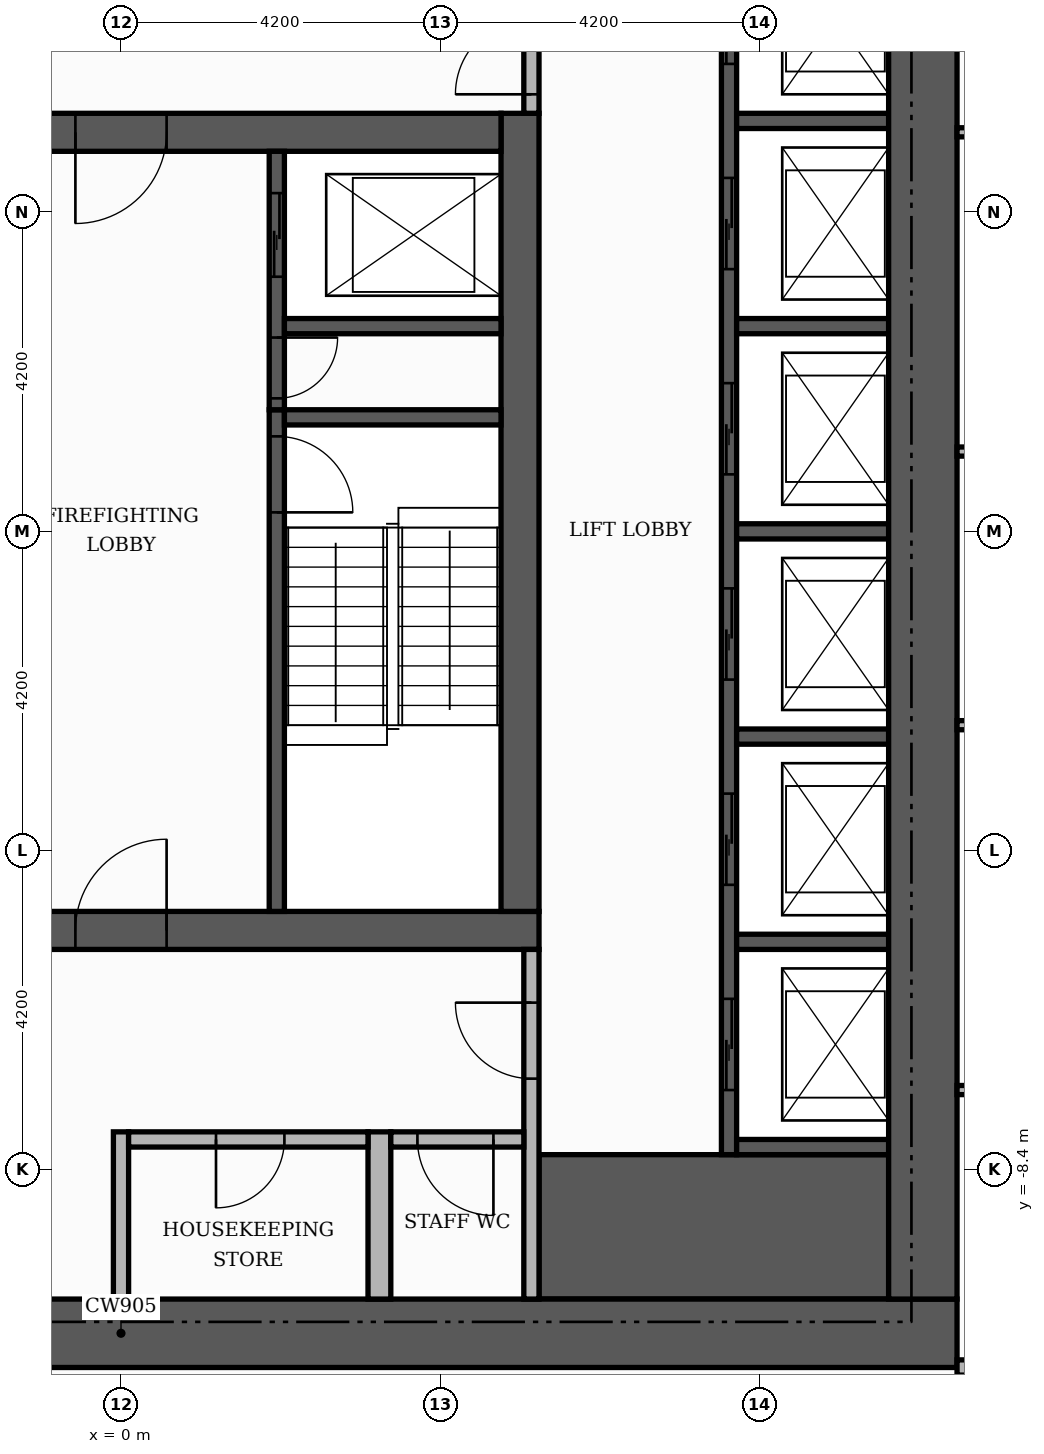
"""IFC4 building model, lengths in metres.
Left out: names, types, materials, properties, quantities, classifications, styles, units other than length and angle.
Written with IfcOpenShell. Run it as: python <this file> out.ifc"""

import sys

from ifc_helpers import new_model, si_unit, direction, frame, frame_2d, origin, place, context, subcontext, project, spatial, rectangle, extrude, element, fill, save


model = new_model("IFC4")
c1 = context("Model", 3, precision=1e-05, world=origin(), true_north=direction((0.0, 1.0)))
c2 = subcontext(c1, "Body", "Model", "MODEL_VIEW")
j1 = project(units=[si_unit("LENGTHUNIT", "METRE"), si_unit("PLANEANGLEUNIT", "RADIAN")], contexts=[c1])
p1 = place(None, origin())
s1 = spatial("IfcSite", under=j1, at=p1, CompositionType="ELEMENT")
p2 = place(p1, origin())
s2 = spatial("IfcBuilding", under=s1, at=p2, CompositionType="ELEMENT")
p3 = place(p2, frame((0.0, 0.0, 271.8)))
s3 = spatial("IfcBuildingStorey", under=s2, at=p3, CompositionType="ELEMENT", Elevation=271.8)
p4 = place(p3, frame((-5.5, -5.25, 0.0), z_axis=(0.0, 0.0, 1.0), x_axis=(1.0, 0.0, 0.0)))
e1 = element("IfcWall", 1, at=p4, inside=s3, PredefinedType="SHEAR", context=c2, shape_type="SweptSolid", body=[
    extrude(rectangle(XDim=11.0, YDim=0.5, at=frame_2d((5.5, 0.0))), origin(), (0.0, 0.0, 1.0), 3.48),
])
p5 = place(p4, frame((4.9, 0.0, 0.0)))
e2 = element("IfcOpeningElement", 2, at=p5, cuts=e1, PredefinedType="OPENING", context=c2, shape_type="SweptSolid", body=[
    extrude(rectangle(XDim=1.2, YDim=2.1, at=frame_2d((0.6, 1.05))), frame((0.0, 0.26, 0.0), z_axis=(0.0, -1.0, 0.0), x_axis=(1.0, 0.0, 0.0)), (0.0, 0.0, 1.0), 0.52),
])
p6 = place(p3, frame((5.25, -5.0, 0.0), z_axis=(0.0, 0.0, 1.0), x_axis=(0.0, 1.0, 0.0)))
e3 = element("IfcWall", 3, at=p6, inside=s3, PredefinedType="SHEAR", context=c2, shape_type="SweptSolid", body=[
    extrude(rectangle(XDim=10.5, YDim=0.5, at=frame_2d((5.25, 0.0))), origin(), (0.0, 0.0, 1.0), 3.48),
])
p7 = place(p3, frame((-5.0, 5.25, 0.0), z_axis=(0.0, 0.0, 1.0), x_axis=(1.0, 0.0, 0.0)))
e4 = element("IfcWall", 4, at=p7, inside=s3, PredefinedType="SHEAR", context=c2, shape_type="SweptSolid", body=[
    extrude(rectangle(XDim=10.0, YDim=0.5, at=frame_2d((5.0, 0.0))), origin(), (0.0, 0.0, 1.0), 3.48),
])
p8 = place(p7, frame((4.4, 0.0, 0.0)))
e5 = element("IfcOpeningElement", 5, at=p8, cuts=e4, PredefinedType="OPENING", context=c2, shape_type="SweptSolid", body=[
    extrude(rectangle(XDim=1.2, YDim=2.1, at=frame_2d((0.6, 1.05))), frame((0.0, 0.26, 0.0), z_axis=(0.0, -1.0, 0.0), x_axis=(1.0, 0.0, 0.0)), (0.0, 0.0, 1.0), 0.52),
])
p9 = place(p3, frame((5.5, -9.15, 0.0), z_axis=(0.0, 0.0, 1.0), x_axis=(1.0, 0.0, 0.0)))
e6 = element("IfcWall", 6, at=p9, inside=s3, PredefinedType="SHEAR", context=c2, shape_type="SweptSolid", body=[
    extrude(rectangle(XDim=4.6, YDim=1.9, at=frame_2d((2.3, 0.0))), origin(), (0.0, 0.0, 1.0), 3.48),
])
p10 = place(p3, frame((2.05, -5.0, 0.0), z_axis=(0.0, 0.0, 1.0), x_axis=(0.0, 1.0, 0.0)))
e7 = element("IfcWall", 7, at=p10, inside=s3, PredefinedType="SHEAR", context=c2, shape_type="SweptSolid", body=[
    extrude(rectangle(XDim=6.6, YDim=0.2, at=frame_2d((3.3, 0.0))), origin(), (0.0, 0.0, 1.0), 3.48),
])
p11 = place(p10, frame((5.25, 0.0, 0.0)))
e8 = element("IfcOpeningElement", 8, at=p11, cuts=e7, PredefinedType="OPENING", context=c2, shape_type="SweptSolid", body=[
    extrude(rectangle(XDim=1.0, YDim=2.1, at=frame_2d((0.5, 1.05))), frame((0.0, 0.11, 0.0), z_axis=(0.0, -1.0, 0.0), x_axis=(1.0, 0.0, 0.0)), (0.0, 0.0, 1.0), 0.22),
])
p12 = place(p3, frame((2.15, 1.5, 0.0), z_axis=(0.0, 0.0, 1.0), x_axis=(1.0, 0.0, 0.0)))
e9 = element("IfcWall", 9, at=p12, inside=s3, PredefinedType="SHEAR", context=c2, shape_type="SweptSolid", body=[
    extrude(rectangle(XDim=2.85, YDim=0.2, at=frame_2d((1.425, 0.0))), origin(), (0.0, 0.0, 1.0), 3.48),
])
p13 = place(p3, frame((8.0, -8.2, 0.0), z_axis=(0.0, 0.0, 1.0), x_axis=(0.0, 1.0, 0.0)))
e10 = element("IfcWall", 10, at=p13, inside=s3, PredefinedType="SHEAR", context=c2, shape_type="SweptSolid", body=[
    extrude(rectangle(XDim=16.4, YDim=0.2, at=frame_2d((8.2, 0.0))), origin(), (0.0, 0.0, 1.0), 3.48),
])
p14 = place(p13, frame((0.85, 0.0, 0.0)))
e11 = element("IfcOpeningElement", 11, at=p14, cuts=e10, PredefinedType="OPENING", context=c2, shape_type="SweptSolid", body=[
    extrude(rectangle(XDim=1.2, YDim=2.1, at=frame_2d((0.6, 1.05))), frame((0.0, 0.11, 0.0), z_axis=(0.0, -1.0, 0.0), x_axis=(1.0, 0.0, 0.0)), (0.0, 0.0, 1.0), 0.22),
])
p15 = place(p13, frame((3.55, 0.0, 0.0)))
e12 = element("IfcOpeningElement", 12, at=p15, cuts=e10, PredefinedType="OPENING", context=c2, shape_type="SweptSolid", body=[
    extrude(rectangle(XDim=1.2, YDim=2.1, at=frame_2d((0.6, 1.05))), frame((0.0, 0.11, 0.0), z_axis=(0.0, -1.0, 0.0), x_axis=(1.0, 0.0, 0.0)), (0.0, 0.0, 1.0), 0.22),
])
p16 = place(p13, frame((6.25, 0.0, 0.0)))
e13 = element("IfcOpeningElement", 13, at=p16, cuts=e10, PredefinedType="OPENING", context=c2, shape_type="SweptSolid", body=[
    extrude(rectangle(XDim=1.2, YDim=2.1, at=frame_2d((0.6, 1.05))), frame((0.0, 0.11, 0.0), z_axis=(0.0, -1.0, 0.0), x_axis=(1.0, 0.0, 0.0)), (0.0, 0.0, 1.0), 0.22),
])
p17 = place(p13, frame((8.95, 0.0, 0.0)))
e14 = element("IfcOpeningElement", 14, at=p17, cuts=e10, PredefinedType="OPENING", context=c2, shape_type="SweptSolid", body=[
    extrude(rectangle(XDim=1.2, YDim=2.1, at=frame_2d((0.6, 1.05))), frame((0.0, 0.11, 0.0), z_axis=(0.0, -1.0, 0.0), x_axis=(1.0, 0.0, 0.0)), (0.0, 0.0, 1.0), 0.22),
])
p18 = place(p13, frame((11.65, 0.0, 0.0)))
e15 = element("IfcOpeningElement", 15, at=p18, cuts=e10, PredefinedType="OPENING", context=c2, shape_type="SweptSolid", body=[
    extrude(rectangle(XDim=1.2, YDim=2.1, at=frame_2d((0.6, 1.05))), frame((0.0, 0.11, 0.0), z_axis=(0.0, -1.0, 0.0), x_axis=(1.0, 0.0, 0.0)), (0.0, 0.0, 1.0), 0.22),
])
p19 = place(p13, frame((14.35, 0.0, 0.0)))
e16 = element("IfcOpeningElement", 16, at=p19, cuts=e10, PredefinedType="OPENING", context=c2, shape_type="SweptSolid", body=[
    extrude(rectangle(XDim=1.2, YDim=2.1, at=frame_2d((0.6, 1.05))), frame((0.0, 0.11, 0.0), z_axis=(0.0, -1.0, 0.0), x_axis=(1.0, 0.0, 0.0)), (0.0, 0.0, 1.0), 0.22),
])
for number, where, z_axis, x_axis in (
    (17, (8.1, -8.1, 0.0), (0.0, 0.0, 1.0), (1.0, 0.0, 0.0)),
    (18, (8.1, -5.4, 0.0), (0.0, 0.0, 1.0), (1.0, 0.0, 0.0)),
    (19, (8.1, -2.7, 0.0), (0.0, 0.0, 1.0), (1.0, 0.0, 0.0)),
    (20, (8.1, 0.0, 0.0), (0.0, 0.0, 1.0), (1.0, 0.0, 0.0)),
):
    element("IfcWall", number, at=place(p3, frame(where, z_axis=z_axis, x_axis=x_axis)), inside=s3, PredefinedType="SHEAR", context=c2, shape_type="SweptSolid", body=[
        extrude(rectangle(XDim=2.0, YDim=0.2, at=frame_2d((1.0, 0.0))), origin(), (0.0, 0.0, 1.0), 3.48),
    ])
p20 = place(p3, frame((2.05, 1.6, 0.0), z_axis=(0.0, 0.0, 1.0), x_axis=(0.0, 1.0, 0.0)))
e21 = element("IfcWall", 21, at=p20, inside=s3, PredefinedType="SHEAR", context=c2, shape_type="SweptSolid", body=[
    extrude(rectangle(XDim=3.4, YDim=0.2, at=frame_2d((1.7, 0.0))), origin(), (0.0, 0.0, 1.0), 3.48),
])
p21 = place(p20, frame((1.75, 0.0, 0.0)))
e22 = element("IfcOpeningElement", 22, at=p21, cuts=e21, PredefinedType="OPENING", context=c2, shape_type="SweptSolid", body=[
    extrude(rectangle(XDim=1.1, YDim=2.1, at=frame_2d((0.55, 1.05))), frame((0.0, 0.11, 0.0), z_axis=(0.0, -1.0, 0.0), x_axis=(1.0, 0.0, 0.0)), (0.0, 0.0, 1.0), 0.22),
])
p22 = place(p20, frame((0.15, 0.0, 0.0)))
e23 = element("IfcOpeningElement", 23, at=p22, cuts=e21, PredefinedType="OPENING", context=c2, shape_type="SweptSolid", body=[
    extrude(rectangle(XDim=0.8, YDim=2.1, at=frame_2d((0.4, 1.05))), frame((0.0, 0.11, 0.0), z_axis=(0.0, -1.0, 0.0), x_axis=(1.0, 0.0, 0.0)), (0.0, 0.0, 1.0), 0.22),
])
p23 = place(p3, frame((2.15, 2.7, 0.0), z_axis=(0.0, 0.0, 1.0), x_axis=(1.0, 0.0, 0.0)))
e24 = element("IfcWall", 24, at=p23, inside=s3, PredefinedType="SHEAR", context=c2, shape_type="SweptSolid", body=[
    extrude(rectangle(XDim=2.85, YDim=0.2, at=frame_2d((1.425, 0.0))), origin(), (0.0, 0.0, 1.0), 3.48),
])
for number, where, z_axis, x_axis in (
    (25, (8.1, 2.7, 0.0), (0.0, 0.0, 1.0), (1.0, 0.0, 0.0)),
    (26, (8.1, 5.4, 0.0), (0.0, 0.0, 1.0), (1.0, 0.0, 0.0)),
):
    element("IfcWall", number, at=place(p3, frame(where, z_axis=z_axis, x_axis=x_axis)), inside=s3, PredefinedType="SHEAR", context=c2, shape_type="SweptSolid", body=[
        extrude(rectangle(XDim=2.0, YDim=0.2, at=frame_2d((1.0, 0.0))), origin(), (0.0, 0.0, 1.0), 3.48),
    ])
p24 = place(p3, frame((-11.0, -10.55, 0.0), z_axis=(0.0, 0.0, 1.0), x_axis=(1.0, 0.0, 0.0)))
e27 = element("IfcWall", 27, at=p24, inside=s3, PredefinedType="SHEAR", context=c2, shape_type="SweptSolid", body=[
    extrude(rectangle(XDim=22.0, YDim=0.9, at=frame_2d((11.0, 0.0))), origin(), (0.0, 0.0, 1.0), 3.48),
])
p25 = place(p24, frame((7.4, 0.0, 0.0)))
e28 = element("IfcOpeningElement", 28, at=p25, cuts=e27, PredefinedType="OPENING", context=c2, shape_type="SweptSolid", body=[
    extrude(rectangle(XDim=1.8, YDim=2.2, at=frame_2d((0.9, 1.1))), frame((0.0, 0.46, 0.0), z_axis=(0.0, -1.0, 0.0), x_axis=(1.0, 0.0, 0.0)), (0.0, 0.0, 1.0), 0.92),
])
p26 = place(p3, frame((10.55, -10.1, 0.0), z_axis=(0.0, 0.0, 1.0), x_axis=(0.0, 1.0, 0.0)))
e29 = element("IfcWall", 29, at=p26, inside=s3, PredefinedType="SHEAR", context=c2, shape_type="SweptSolid", body=[
    extrude(rectangle(XDim=20.2, YDim=0.9, at=frame_2d((10.1, 0.0))), origin(), (0.0, 0.0, 1.0), 3.48),
])
p27 = place(p3, frame((0.0, -10.1, 0.0), z_axis=(0.0, 0.0, 1.0), x_axis=(0.0, 1.0, 0.0)))
e30 = element("IfcWall", 30, at=p27, inside=s3, PredefinedType="PARTITIONING", context=c2, shape_type="SweptSolid", body=[
    extrude(rectangle(XDim=2.2, YDim=0.2, at=frame_2d((1.1, 0.0))), origin(), (0.0, 0.0, 1.0), 3.48),
])
p28 = place(p3, frame((3.4, -10.1, 0.0), z_axis=(0.0, 0.0, 1.0), x_axis=(0.0, 1.0, 0.0)))
e31 = element("IfcWall", 31, at=p28, inside=s3, PredefinedType="PARTITIONING", context=c2, shape_type="SweptSolid", body=[
    extrude(rectangle(XDim=2.2, YDim=0.3, at=frame_2d((1.1, 0.0))), origin(), (0.0, 0.0, 1.0), 3.48),
])
p29 = place(p3, frame((5.4, -10.1, 0.0), z_axis=(0.0, 0.0, 1.0), x_axis=(0.0, 1.0, 0.0)))
e32 = element("IfcWall", 32, at=p29, inside=s3, PredefinedType="PARTITIONING", context=c2, shape_type="SweptSolid", body=[
    extrude(rectangle(XDim=4.6, YDim=0.2, at=frame_2d((2.3, 0.0))), origin(), (0.0, 0.0, 1.0), 3.48),
])
p30 = place(p29, frame((2.9, 0.0, 0.0)))
e33 = element("IfcOpeningElement", 33, at=p30, cuts=e32, PredefinedType="OPENING", context=c2, shape_type="SweptSolid", body=[
    extrude(rectangle(XDim=1.0, YDim=2.1, at=frame_2d((0.5, 1.05))), frame((0.0, 0.11, 0.0), z_axis=(0.0, -1.0, 0.0), x_axis=(1.0, 0.0, 0.0)), (0.0, 0.0, 1.0), 0.22),
])
p31 = place(p3, frame((0.1, -8.0, 0.0), z_axis=(0.0, 0.0, 1.0), x_axis=(1.0, 0.0, 0.0)))
e34 = element("IfcWall", 34, at=p31, inside=s3, PredefinedType="PARTITIONING", context=c2, shape_type="SweptSolid", body=[
    extrude(rectangle(XDim=3.15, YDim=0.2, at=frame_2d((1.575, 0.0))), origin(), (0.0, 0.0, 1.0), 3.48),
])
p32 = place(p31, frame((1.15, 0.0, 0.0)))
e35 = element("IfcOpeningElement", 35, at=p32, cuts=e34, PredefinedType="OPENING", context=c2, shape_type="SweptSolid", body=[
    extrude(rectangle(XDim=0.9, YDim=2.1, at=frame_2d((0.45, 1.05))), frame((0.0, 0.11, 0.0), z_axis=(0.0, -1.0, 0.0), x_axis=(1.0, 0.0, 0.0)), (0.0, 0.0, 1.0), 0.22),
])
p33 = place(p3, frame((3.55, -8.0, 0.0), z_axis=(0.0, 0.0, 1.0), x_axis=(1.0, 0.0, 0.0)))
e36 = element("IfcWall", 36, at=p33, inside=s3, PredefinedType="PARTITIONING", context=c2, shape_type="SweptSolid", body=[
    extrude(rectangle(XDim=1.75, YDim=0.2, at=frame_2d((0.875, 0.0))), origin(), (0.0, 0.0, 1.0), 3.48),
])
p34 = place(p33, frame((0.35, 0.0, 0.0)))
e37 = element("IfcOpeningElement", 37, at=p34, cuts=e36, PredefinedType="OPENING", context=c2, shape_type="SweptSolid", body=[
    extrude(rectangle(XDim=1.0, YDim=2.1, at=frame_2d((0.5, 1.05))), frame((0.0, 0.11, 0.0), z_axis=(0.0, -1.0, 0.0), x_axis=(1.0, 0.0, 0.0)), (0.0, 0.0, 1.0), 0.22),
])
p35 = place(p3, frame((5.4, 5.5, 0.0), z_axis=(0.0, 0.0, 1.0), x_axis=(0.0, 1.0, 0.0)))
e38 = element("IfcWall", 38, at=p35, inside=s3, PredefinedType="PARTITIONING", context=c2, shape_type="SweptSolid", body=[
    extrude(rectangle(XDim=4.6, YDim=0.2, at=frame_2d((2.3, 0.0))), origin(), (0.0, 0.0, 1.0), 3.48),
])
p36 = place(p35, frame((0.25, 0.0, 0.0)))
e39 = element("IfcOpeningElement", 39, at=p36, cuts=e38, PredefinedType="OPENING", context=c2, shape_type="SweptSolid", body=[
    extrude(rectangle(XDim=1.0, YDim=2.1, at=frame_2d((0.5, 1.05))), frame((0.0, 0.11, 0.0), z_axis=(0.0, -1.0, 0.0), x_axis=(1.0, 0.0, 0.0)), (0.0, 0.0, 1.0), 0.22),
])
p37 = place(p3, frame((11.0, -11.0, 0.0), z_axis=(0.0, 0.0, 1.0), x_axis=(1.0, 0.0, 0.0)))
e40 = element("IfcWall", 40, at=p37, inside=s3, PredefinedType="PARTITIONING", context=c2, shape_type="SweptSolid", body=[
    extrude(rectangle(XDim=2.65, YDim=0.2, at=frame_2d((1.325, 0.0))), origin(), (0.0, 0.0, 1.0), 3.48),
])
p38 = place(p37, frame((0.775, 0.0, 0.0)))
e41 = element("IfcOpeningElement", 41, at=p38, cuts=e40, PredefinedType="OPENING", context=c2, shape_type="SweptSolid", body=[
    extrude(rectangle(XDim=1.1, YDim=2.4, at=frame_2d((0.55, 1.2))), frame((0.0, 0.11, 0.0), z_axis=(0.0, -1.0, 0.0), x_axis=(1.0, 0.0, 0.0)), (0.0, 0.0, 1.0), 0.22),
])
p39 = place(p3, frame((11.0, -7.35, 0.0), z_axis=(0.0, 0.0, 1.0), x_axis=(1.0, 0.0, 0.0)))
e42 = element("IfcWall", 42, at=p39, inside=s3, PredefinedType="PARTITIONING", context=c2, shape_type="SweptSolid", body=[
    extrude(rectangle(XDim=7.32, YDim=0.12, at=frame_2d((3.66, 0.0))), origin(), (0.0, 0.0, 1.0), 3.48),
])
p40 = place(p39, frame((3.21, 0.0, 0.0)))
e43 = element("IfcOpeningElement", 43, at=p40, cuts=e42, PredefinedType="OPENING", context=c2, shape_type="SweptSolid", body=[
    extrude(rectangle(XDim=0.9, YDim=2.1, at=frame_2d((0.45, 1.05))), frame((0.0, 0.07, 0.0), z_axis=(0.0, -1.0, 0.0), x_axis=(1.0, 0.0, 0.0)), (0.0, 0.0, 1.0), 0.14),
])
for number, where, z_axis, x_axis in (
    (44, (11.0, -2.55, 0.0), (0.0, 0.0, 1.0), (1.0, 0.0, 0.0)),
    (45, (11.0, 1.05, 0.0), (0.0, 0.0, 1.0), (1.0, 0.0, 0.0)),
    (46, (11.0, 5.25, 0.0), (0.0, 0.0, 1.0), (1.0, 0.0, 0.0)),
):
    element("IfcWall", number, at=place(p3, frame(where, z_axis=z_axis, x_axis=x_axis)), inside=s3, PredefinedType="PARTITIONING", context=c2, shape_type="SweptSolid", body=[
        extrude(rectangle(XDim=7.32, YDim=0.12, at=frame_2d((3.66, 0.0))), origin(), (0.0, 0.0, 1.0), 3.48),
    ])
p41 = place(p14, origin())
e47 = element("IfcDoor", 47, at=p41, inside=s3, OperationType="SLIDING_TO_LEFT", PredefinedType="DOOR", context=c2, shape_type="SweptSolid", body=[
    extrude(rectangle(XDim=1.2, YDim=2.1, at=frame_2d((0.6, 1.05))), frame((0.0, 0.025, 0.0), z_axis=(0.0, -1.0, 0.0), x_axis=(1.0, 0.0, 0.0)), (0.0, 0.0, 1.0), 0.05),
])
fill(e11, e47)
p42 = place(p15, origin())
e48 = element("IfcDoor", 48, at=p42, inside=s3, OperationType="SLIDING_TO_LEFT", PredefinedType="DOOR", context=c2, shape_type="SweptSolid", body=[
    extrude(rectangle(XDim=1.2, YDim=2.1, at=frame_2d((0.6, 1.05))), frame((0.0, 0.025, 0.0), z_axis=(0.0, -1.0, 0.0), x_axis=(1.0, 0.0, 0.0)), (0.0, 0.0, 1.0), 0.05),
])
fill(e12, e48)
p43 = place(p16, origin())
e49 = element("IfcDoor", 49, at=p43, inside=s3, OperationType="SLIDING_TO_LEFT", PredefinedType="DOOR", context=c2, shape_type="SweptSolid", body=[
    extrude(rectangle(XDim=1.2, YDim=2.1, at=frame_2d((0.6, 1.05))), frame((0.0, 0.025, 0.0), z_axis=(0.0, -1.0, 0.0), x_axis=(1.0, 0.0, 0.0)), (0.0, 0.0, 1.0), 0.05),
])
fill(e13, e49)
p44 = place(p17, origin())
e50 = element("IfcDoor", 50, at=p44, inside=s3, OperationType="SLIDING_TO_LEFT", PredefinedType="DOOR", context=c2, shape_type="SweptSolid", body=[
    extrude(rectangle(XDim=1.2, YDim=2.1, at=frame_2d((0.6, 1.05))), frame((0.0, 0.025, 0.0), z_axis=(0.0, -1.0, 0.0), x_axis=(1.0, 0.0, 0.0)), (0.0, 0.0, 1.0), 0.05),
])
fill(e14, e50)
p45 = place(p18, origin())
e51 = element("IfcDoor", 51, at=p45, inside=s3, OperationType="SLIDING_TO_LEFT", PredefinedType="DOOR", context=c2, shape_type="SweptSolid", body=[
    extrude(rectangle(XDim=1.2, YDim=2.1, at=frame_2d((0.6, 1.05))), frame((0.0, 0.025, 0.0), z_axis=(0.0, -1.0, 0.0), x_axis=(1.0, 0.0, 0.0)), (0.0, 0.0, 1.0), 0.05),
])
fill(e15, e51)
p46 = place(p19, origin())
e52 = element("IfcDoor", 52, at=p46, inside=s3, OperationType="SLIDING_TO_LEFT", PredefinedType="DOOR", context=c2, shape_type="SweptSolid", body=[
    extrude(rectangle(XDim=1.2, YDim=2.1, at=frame_2d((0.6, 1.05))), frame((0.0, 0.025, 0.0), z_axis=(0.0, -1.0, 0.0), x_axis=(1.0, 0.0, 0.0)), (0.0, 0.0, 1.0), 0.05),
])
fill(e16, e52)
p47 = place(p21, origin())
e53 = element("IfcDoor", 53, at=p47, inside=s3, OperationType="SLIDING_TO_LEFT", PredefinedType="DOOR", context=c2, shape_type="SweptSolid", body=[
    extrude(rectangle(XDim=1.1, YDim=2.1, at=frame_2d((0.55, 1.05))), frame((0.0, 0.025, 0.0), z_axis=(0.0, -1.0, 0.0), x_axis=(1.0, 0.0, 0.0)), (0.0, 0.0, 1.0), 0.05),
])
fill(e22, e53)
p48 = place(p11, frame((1.0, 0.0, 0.0), z_axis=(0.0, 0.0, 1.0), x_axis=(-1.0, 0.0, 0.0)))
e54 = element("IfcDoor", 54, at=p48, inside=s3, OperationType="SINGLE_SWING_LEFT", PredefinedType="DOOR", context=c2, shape_type="SweptSolid", body=[
    extrude(rectangle(XDim=1.0, YDim=2.1, at=frame_2d((0.5, 1.05))), frame((0.0, 0.025, 0.0), z_axis=(0.0, -1.0, 0.0), x_axis=(1.0, 0.0, 0.0)), (0.0, 0.0, 1.0), 0.05),
])
fill(e8, e54)
p49 = place(p22, frame((0.8, 0.0, 0.0), z_axis=(0.0, 0.0, 1.0), x_axis=(-1.0, 0.0, 0.0)))
e55 = element("IfcDoor", 55, at=p49, inside=s3, OperationType="SINGLE_SWING_RIGHT", PredefinedType="DOOR", context=c2, shape_type="SweptSolid", body=[
    extrude(rectangle(XDim=0.8, YDim=2.1, at=frame_2d((0.4, 1.05))), frame((0.0, 0.025, 0.0), z_axis=(0.0, -1.0, 0.0), x_axis=(1.0, 0.0, 0.0)), (0.0, 0.0, 1.0), 0.05),
])
fill(e23, e55)
p50 = place(p8, frame((1.2, 0.0, 0.0), z_axis=(0.0, 0.0, 1.0), x_axis=(-1.0, 0.0, 0.0)))
e56 = element("IfcDoor", 56, at=p50, inside=s3, OperationType="SINGLE_SWING_LEFT", PredefinedType="DOOR", context=c2, shape_type="SweptSolid", body=[
    extrude(rectangle(XDim=1.2, YDim=2.1, at=frame_2d((0.6, 1.05))), frame((0.0, 0.025, 0.0), z_axis=(0.0, -1.0, 0.0), x_axis=(1.0, 0.0, 0.0)), (0.0, 0.0, 1.0), 0.05),
])
fill(e5, e56)
p51 = place(p5, origin())
e57 = element("IfcDoor", 57, at=p51, inside=s3, OperationType="SINGLE_SWING_RIGHT", PredefinedType="DOOR", context=c2, shape_type="SweptSolid", body=[
    extrude(rectangle(XDim=1.2, YDim=2.1, at=frame_2d((0.6, 1.05))), frame((0.0, 0.025, 0.0), z_axis=(0.0, -1.0, 0.0), x_axis=(1.0, 0.0, 0.0)), (0.0, 0.0, 1.0), 0.05),
])
fill(e2, e57)
p52 = place(p36, origin())
e58 = element("IfcDoor", 58, at=p52, inside=s3, OperationType="SINGLE_SWING_LEFT", PredefinedType="DOOR", context=c2, shape_type="SweptSolid", body=[
    extrude(rectangle(XDim=1.0, YDim=2.1, at=frame_2d((0.5, 1.05))), frame((0.0, 0.025, 0.0), z_axis=(0.0, -1.0, 0.0), x_axis=(1.0, 0.0, 0.0)), (0.0, 0.0, 1.0), 0.05),
])
fill(e39, e58)
p53 = place(p30, origin())
e59 = element("IfcDoor", 59, at=p53, inside=s3, OperationType="SINGLE_SWING_RIGHT", PredefinedType="DOOR", context=c2, shape_type="SweptSolid", body=[
    extrude(rectangle(XDim=1.0, YDim=2.1, at=frame_2d((0.5, 1.05))), frame((0.0, 0.025, 0.0), z_axis=(0.0, -1.0, 0.0), x_axis=(1.0, 0.0, 0.0)), (0.0, 0.0, 1.0), 0.05),
])
fill(e33, e59)
p54 = place(p32, frame((0.9, 0.0, 0.0), z_axis=(0.0, 0.0, 1.0), x_axis=(-1.0, 0.0, 0.0)))
e60 = element("IfcDoor", 60, at=p54, inside=s3, OperationType="SINGLE_SWING_LEFT", PredefinedType="DOOR", context=c2, shape_type="SweptSolid", body=[
    extrude(rectangle(XDim=0.9, YDim=2.1, at=frame_2d((0.45, 1.05))), frame((0.0, 0.025, 0.0), z_axis=(0.0, -1.0, 0.0), x_axis=(1.0, 0.0, 0.0)), (0.0, 0.0, 1.0), 0.05),
])
fill(e35, e60)
p55 = place(p34, frame((1.0, 0.0, 0.0), z_axis=(0.0, 0.0, 1.0), x_axis=(-1.0, 0.0, 0.0)))
e61 = element("IfcDoor", 61, at=p55, inside=s3, OperationType="SINGLE_SWING_RIGHT", PredefinedType="DOOR", context=c2, shape_type="SweptSolid", body=[
    extrude(rectangle(XDim=1.0, YDim=2.1, at=frame_2d((0.5, 1.05))), frame((0.0, 0.025, 0.0), z_axis=(0.0, -1.0, 0.0), x_axis=(1.0, 0.0, 0.0)), (0.0, 0.0, 1.0), 0.05),
])
fill(e37, e61)
save(model, sys.argv[1])
